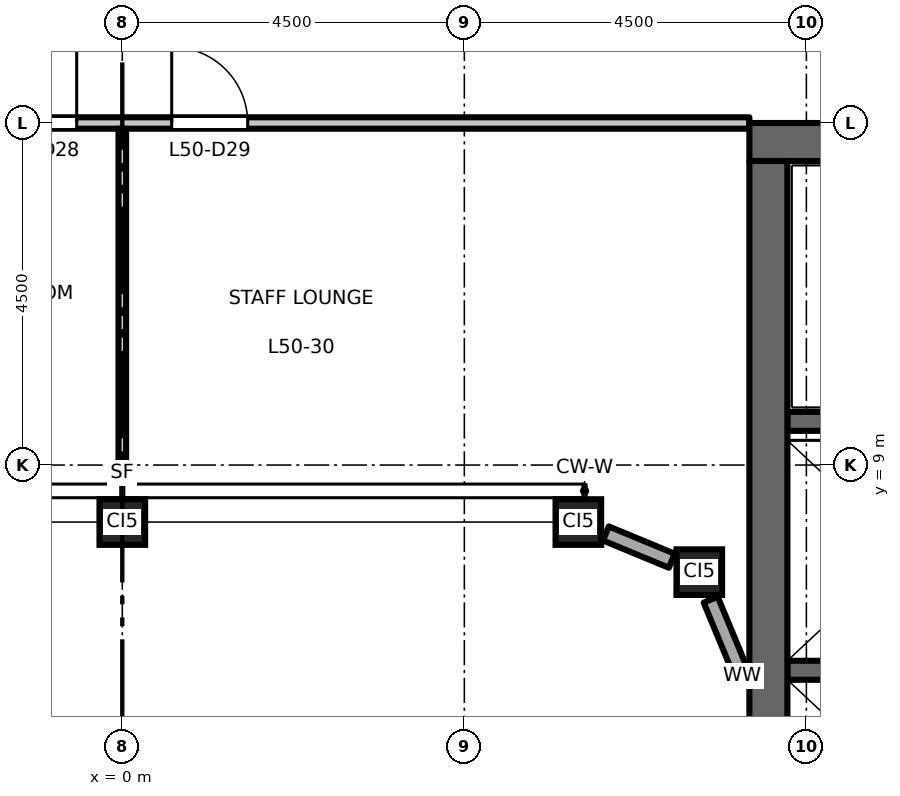
"""IFC4 building model, lengths in metres.
Left out: names, types, materials, properties, quantities, classifications, styles, units other than length and angle.
Written with IfcOpenShell. Run it as: python <this file> out.ifc"""

import sys

from ifc_helpers import new_model, si_unit, direction, frame, frame_2d, origin, origin_2d, place, context, subcontext, project, spatial, rectangle, hollow_rectangle, extrude, element, fill, save


model = new_model("IFC4")
c1 = context("Model", 3, precision=1e-05, world=origin(), true_north=direction((0.0, 1.0)))
c2 = subcontext(c1, "Body", "Model", "MODEL_VIEW")
j1 = project(units=[si_unit("LENGTHUNIT", "METRE"), si_unit("PLANEANGLEUNIT", "RADIAN")], contexts=[c1])
p1 = place(None, origin())
s1 = spatial("IfcSite", under=j1, at=p1, CompositionType="ELEMENT")
p2 = place(p1, origin())
s2 = spatial("IfcBuilding", under=s1, at=p2, CompositionType="ELEMENT")
p3 = place(p2, frame((0.0, 0.0, 233.2)))
s3 = spatial("IfcBuildingStorey", under=s2, at=p3, CompositionType="ELEMENT", Elevation=233.2)
for number, where, z_axis, x_axis in (
    (1, (0.0, 8.25, 0.0), (0.0, 0.0, 1.0), (1.0, 0.0, 0.0)),
    (2, (6.0, 8.25, 0.0), (0.0, 0.0, 1.0), (1.0, 0.0, 0.0)),
    (3, (7.591, 7.591, 0.0), (0.0, 0.0, 1.0), (1.0, 0.0, 0.0)),
):
    element("IfcColumn", number, at=place(p3, frame(where, z_axis=z_axis, x_axis=x_axis)), inside=s3, PredefinedType="COLUMN", context=c2, shape_type="SweptSolid", body=[
        extrude(hollow_rectangle(XDim=0.6, YDim=0.6, WallThickness=0.032, at=origin_2d()), origin(), (0.0, 0.0, 1.0), 4.5),
    ])
p4 = place(p3, frame((8.75, 6.3, 0.0), z_axis=(0.0, 0.0, 1.0), x_axis=(1.0, 0.0, 0.0)))
e4 = element("IfcWall", 4, at=p4, inside=s3, PredefinedType="SHEAR", context=c2, shape_type="SweptSolid", body=[
    extrude(rectangle(XDim=3.1, YDim=0.25, at=frame_2d((1.55, 0.0))), origin(), (0.0, 0.0, 1.0), 4.35),
])
p5 = place(p3, frame((8.75, 9.575, 0.0), z_axis=(0.0, 0.0, 1.0), x_axis=(1.0, 0.0, 0.0)))
e5 = element("IfcWall", 5, at=p5, inside=s3, PredefinedType="SHEAR", context=c2, shape_type="SweptSolid", body=[
    extrude(rectangle(XDim=8.0, YDim=0.25, at=frame_2d((4.0, 0.0))), origin(), (0.0, 0.0, 1.0), 4.35),
])
p6 = place(p5, frame((6.65, 0.0, 0.0)))
e6 = element("IfcOpeningElement", 6, at=p6, cuts=e5, PredefinedType="OPENING", context=c2, shape_type="SweptSolid", body=[
    extrude(rectangle(XDim=1.1, YDim=2.1, at=frame_2d((0.55, 1.05))), frame((0.0, 0.135, 0.0), z_axis=(0.0, -1.0, 0.0), x_axis=(1.0, 0.0, 0.0)), (0.0, 0.0, 1.0), 0.27),
])
p7 = place(p3, frame((8.25, 13.25, 0.0), z_axis=(0.0, 0.0, 1.0), x_axis=(1.0, 0.0, 0.0)))
e7 = element("IfcWall", 7, at=p7, inside=s3, PredefinedType="SHEAR", context=c2, shape_type="SweptSolid", body=[
    extrude(rectangle(XDim=13.5, YDim=0.5, at=frame_2d((6.75, 0.0))), origin(), (0.0, 0.0, 1.0), 4.35),
])
p8 = place(p3, frame((8.5, -13.0, 0.0), z_axis=(0.0, 0.0, 1.0), x_axis=(0.0, 1.0, 0.0)))
e8 = element("IfcWall", 8, at=p8, inside=s3, PredefinedType="SHEAR", context=c2, shape_type="SweptSolid", body=[
    extrude(rectangle(XDim=26.0, YDim=0.5, at=frame_2d((13.0, 0.0))), origin(), (0.0, 0.0, 1.0), 4.35),
])
p9 = place(p3, frame((8.154, 6.231, 0.0), z_axis=(0.0, 0.0, 1.0), x_axis=(-0.382704496366, 0.923870807235, 0.0)))
e9 = element("IfcWall", 9, at=p9, inside=s3, PredefinedType="STANDARD", context=c2, shape_type="SweptSolid", body=[
    extrude(rectangle(XDim=1.08, YDim=0.2, at=frame_2d((0.54, 0.0))), origin(), (0.0, 0.0, 1.0), 3.918),
])
p10 = place(p3, frame((7.229, 7.741, 0.0), z_axis=(0.0, 0.0, 1.0), x_axis=(-0.923829670615, 0.382803787458, 0.0)))
e10 = element("IfcWall", 10, at=p10, inside=s3, PredefinedType="STANDARD", context=c2, shape_type="SweptSolid", body=[
    extrude(rectangle(XDim=0.938, YDim=0.2, at=frame_2d((0.469, 0.0))), origin(), (0.0, 0.0, 1.0), 3.918),
])
p11 = place(p3, frame((-8.25, 13.5, 0.0), z_axis=(0.0, 0.0, 1.0), x_axis=(1.0, 0.0, 0.0)))
e11 = element("IfcWall", 11, at=p11, inside=s3, PredefinedType="PARTITIONING", context=c2, shape_type="SweptSolid", body=[
    extrude(rectangle(XDim=16.5, YDim=0.15, at=frame_2d((8.25, 0.0))), origin(), (0.0, 0.0, 1.0), 4.35),
])
p12 = place(p11, frame((6.65, 0.0, 0.0)))
e12 = element("IfcOpeningElement", 12, at=p12, cuts=e11, PredefinedType="OPENING", context=c2, shape_type="SweptSolid", body=[
    extrude(rectangle(XDim=1.0, YDim=2.1, at=frame_2d((0.5, 1.05))), frame((0.0, 0.085, 0.0), z_axis=(0.0, -1.0, 0.0), x_axis=(1.0, 0.0, 0.0)), (0.0, 0.0, 1.0), 0.17),
])
p13 = place(p11, frame((8.9, 0.0, 0.0)))
e13 = element("IfcOpeningElement", 13, at=p13, cuts=e11, PredefinedType="OPENING", context=c2, shape_type="SweptSolid", body=[
    extrude(rectangle(XDim=1.0, YDim=2.1, at=frame_2d((0.5, 1.05))), frame((0.0, 0.085, 0.0), z_axis=(0.0, -1.0, 0.0), x_axis=(1.0, 0.0, 0.0)), (0.0, 0.0, 1.0), 0.17),
])
p14 = place(p3, frame((0.0, 8.6, 0.0), z_axis=(0.0, 0.0, 1.0), x_axis=(0.0, 1.0, 0.0)))
e14 = element("IfcWall", 14, at=p14, inside=s3, PredefinedType="PARTITIONING", context=c2, shape_type="SweptSolid", body=[
    extrude(rectangle(XDim=4.825, YDim=0.1, at=frame_2d((2.413, 0.0))), origin(), (0.0, 0.0, 1.0), 3.55),
])
p15 = place(p12, origin())
e15 = element("IfcDoor", 15, at=p15, inside=s3, OperationType="SINGLE_SWING_RIGHT", PredefinedType="DOOR", context=c2, shape_type="SweptSolid", body=[
    extrude(rectangle(XDim=1.0, YDim=2.1, at=frame_2d((0.5, 1.05))), frame((0.0, 0.025, 0.0), z_axis=(0.0, -1.0, 0.0), x_axis=(1.0, 0.0, 0.0)), (0.0, 0.0, 1.0), 0.05),
])
fill(e12, e15)
p16 = place(p13, origin())
e16 = element("IfcDoor", 16, at=p16, inside=s3, OperationType="SINGLE_SWING_LEFT", PredefinedType="DOOR", context=c2, shape_type="SweptSolid", body=[
    extrude(rectangle(XDim=1.0, YDim=2.1, at=frame_2d((0.5, 1.05))), frame((0.0, 0.025, 0.0), z_axis=(0.0, -1.0, 0.0), x_axis=(1.0, 0.0, 0.0)), (0.0, 0.0, 1.0), 0.05),
])
fill(e13, e16)
save(model, sys.argv[1])
